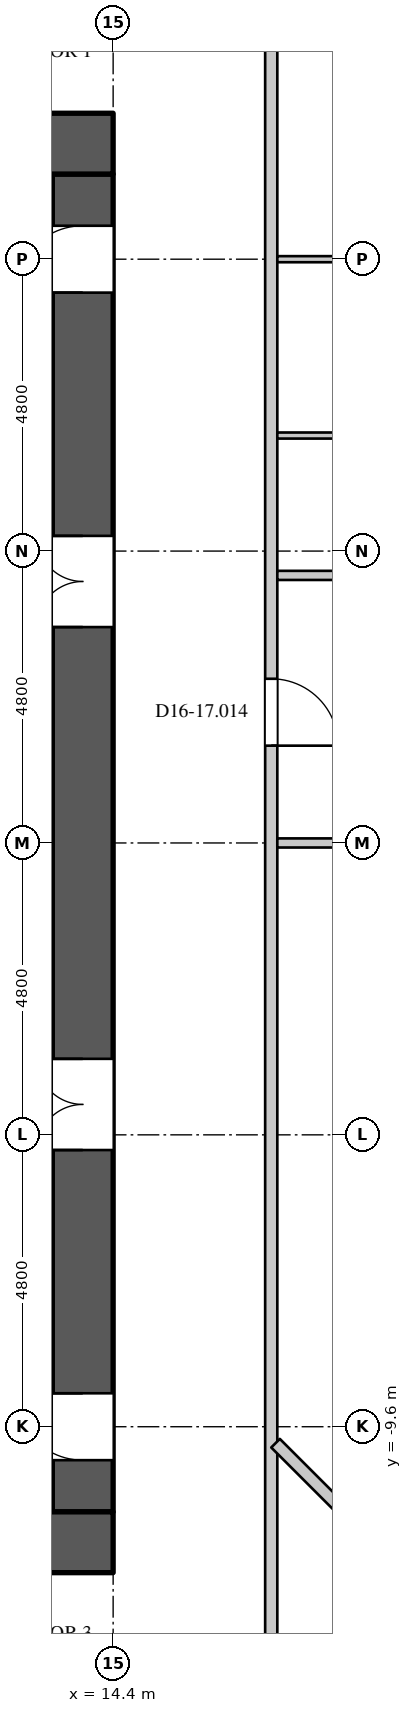
"""IFC4 building model, lengths in metres.
Left out: names, types, materials, properties, quantities, classifications, styles, units other than length and angle.
Written with IfcOpenShell. Run it as: python <this file> out.ifc"""

import sys

from ifc_helpers import new_model, si_unit, direction, frame, frame_2d, origin, place, context, subcontext, project, spatial, rectangle, extrude, element, fill, save


model = new_model("IFC4")
c1 = context("Model", 3, precision=1e-05, world=origin(), true_north=direction((0.0, 1.0)))
c2 = subcontext(c1, "Body", "Model", "MODEL_VIEW")
j1 = project(units=[si_unit("LENGTHUNIT", "METRE"), si_unit("PLANEANGLEUNIT", "RADIAN")], contexts=[c1])
p1 = place(None, origin())
s1 = spatial("IfcSite", under=j1, at=p1, CompositionType="ELEMENT")
p2 = place(p1, origin())
s2 = spatial("IfcBuilding", under=s1, at=p2, CompositionType="ELEMENT")
p3 = place(p2, frame((0.0, 0.0, 71.7)))
s3 = spatial("IfcBuildingStorey", under=s2, at=p3, CompositionType="ELEMENT", Elevation=71.7)
for number, where, z_axis, x_axis in (
    (1, (-14.4, 11.5, 0.0), (0.0, 0.0, 1.0), (1.0, 0.0, 0.0)),
    (2, (-14.4, -11.5, 0.0), (0.0, 0.0, 1.0), (1.0, 0.0, 0.0)),
):
    element("IfcWall", number, at=place(p3, frame(where, z_axis=z_axis, x_axis=x_axis)), inside=s3, PredefinedType="SHEAR", context=c2, shape_type="SweptSolid", body=[
        extrude(rectangle(XDim=28.8, YDim=1.0, at=frame_2d((14.4, 0.0))), origin(), (0.0, 0.0, 1.0), 4.2),
    ])
p4 = place(p3, frame((13.9, -11.0, 0.0), z_axis=(0.0, 0.0, 1.0), x_axis=(0.0, 1.0, 0.0)))
e3 = element("IfcWall", 3, at=p4, inside=s3, PredefinedType="SHEAR", context=c2, shape_type="SweptSolid", body=[
    extrude(rectangle(XDim=22.0, YDim=1.0, at=frame_2d((11.0, 0.0))), origin(), (0.0, 0.0, 1.0), 4.2),
])
p5 = place(p4, frame((20.05, 0.0, 0.0)))
e4 = element("IfcOpeningElement", 4, at=p5, cuts=e3, PredefinedType="OPENING", context=c2, shape_type="SweptSolid", body=[
    extrude(rectangle(XDim=1.1, YDim=2.2, at=frame_2d((0.55, 1.1))), frame((0.0, 0.51, 0.0), z_axis=(0.0, -1.0, 0.0), x_axis=(1.0, 0.0, 0.0)), (0.0, 0.0, 1.0), 1.02),
])
p6 = place(p4, frame((0.85, 0.0, 0.0)))
e5 = element("IfcOpeningElement", 5, at=p6, cuts=e3, PredefinedType="OPENING", context=c2, shape_type="SweptSolid", body=[
    extrude(rectangle(XDim=1.1, YDim=2.2, at=frame_2d((0.55, 1.1))), frame((0.0, 0.51, 0.0), z_axis=(0.0, -1.0, 0.0), x_axis=(1.0, 0.0, 0.0)), (0.0, 0.0, 1.0), 1.02),
])
p7 = place(p4, frame((14.55, 0.0, 0.0)))
e6 = element("IfcOpeningElement", 6, at=p7, cuts=e3, PredefinedType="OPENING", context=c2, shape_type="SweptSolid", body=[
    extrude(rectangle(XDim=1.5, YDim=2.4, at=frame_2d((0.75, 1.2))), frame((0.0, 0.51, 0.0), z_axis=(0.0, -1.0, 0.0), x_axis=(1.0, 0.0, 0.0)), (0.0, 0.0, 1.0), 1.02),
])
p8 = place(p4, frame((5.95, 0.0, 0.0)))
e7 = element("IfcOpeningElement", 7, at=p8, cuts=e3, PredefinedType="OPENING", context=c2, shape_type="SweptSolid", body=[
    extrude(rectangle(XDim=1.5, YDim=2.4, at=frame_2d((0.75, 1.2))), frame((0.0, 0.51, 0.0), z_axis=(0.0, -1.0, 0.0), x_axis=(1.0, 0.0, 0.0)), (0.0, 0.0, 1.0), 1.02),
])
p9 = place(p3, frame((17.0, -14.5, 0.0), z_axis=(0.0, 0.0, 1.0), x_axis=(0.0, 1.0, 0.0)))
e8 = element("IfcWall", 8, at=p9, inside=s3, PredefinedType="PARTITIONING", context=c2, shape_type="SweptSolid", body=[
    extrude(rectangle(XDim=29.0, YDim=0.2, at=frame_2d((14.5, 0.0))), origin(), (0.0, 0.0, 1.0), 3.95),
])
p10 = place(p9, frame((16.1, 0.0, 0.0)))
e9 = element("IfcOpeningElement", 9, at=p10, cuts=e8, PredefinedType="OPENING", context=c2, shape_type="SweptSolid", body=[
    extrude(rectangle(XDim=1.1, YDim=2.4, at=frame_2d((0.55, 1.2))), frame((0.0, 0.11, 0.0), z_axis=(0.0, -1.0, 0.0), x_axis=(1.0, 0.0, 0.0)), (0.0, 0.0, 1.0), 0.22),
])
p11 = place(p3, frame((17.1, 0.0, 0.0), z_axis=(0.0, 0.0, 1.0), x_axis=(1.0, 0.0, 0.0)))
e10 = element("IfcWall", 10, at=p11, inside=s3, PredefinedType="PARTITIONING", context=c2, shape_type="SweptSolid", body=[
    extrude(rectangle(XDim=11.755, YDim=0.15, at=frame_2d((5.877, 0.0))), origin(), (0.0, 0.0, 1.0), 3.95),
])
p12 = place(p11, frame((1.85, 0.0, 0.0)))
e11 = element("IfcOpeningElement", 11, at=p12, cuts=e10, PredefinedType="OPENING", context=c2, shape_type="SweptSolid", body=[
    extrude(rectangle(XDim=0.95, YDim=2.2, at=frame_2d((0.475, 1.1))), frame((0.0, 0.085, 0.0), z_axis=(0.0, -1.0, 0.0), x_axis=(1.0, 0.0, 0.0)), (0.0, 0.0, 1.0), 0.17),
])
p13 = place(p3, frame((17.1, 4.4, 0.0), z_axis=(0.0, 0.0, 1.0), x_axis=(1.0, 0.0, 0.0)))
e12 = element("IfcWall", 12, at=p13, inside=s3, PredefinedType="PARTITIONING", context=c2, shape_type="SweptSolid", body=[
    extrude(rectangle(XDim=4.625, YDim=0.15, at=frame_2d((2.312, 0.0))), origin(), (0.0, 0.0, 1.0), 3.95),
])
p14 = place(p13, frame((1.85, 0.0, 0.0)))
e13 = element("IfcOpeningElement", 13, at=p14, cuts=e12, PredefinedType="OPENING", context=c2, shape_type="SweptSolid", body=[
    extrude(rectangle(XDim=0.95, YDim=2.2, at=frame_2d((0.475, 1.1))), frame((0.0, 0.085, 0.0), z_axis=(0.0, -1.0, 0.0), x_axis=(1.0, 0.0, 0.0)), (0.0, 0.0, 1.0), 0.17),
])
p15 = place(p3, frame((17.216, 17.216, 0.0), z_axis=(0.0, 0.0, 1.0), x_axis=(0.707122656422, -0.707090905595, 0.0)))
e14 = element("IfcWall", 14, at=p15, inside=s3, PredefinedType="PARTITIONING", context=c2, shape_type="SweptSolid", body=[
    extrude(rectangle(XDim=7.689, YDim=0.15, at=frame_2d((3.845, 0.0))), origin(), (0.0, 0.0, 1.0), 3.95),
])
p16 = place(p15, frame((6.55, 0.0, 0.0)))
e15 = element("IfcOpeningElement", 15, at=p16, cuts=e14, PredefinedType="OPENING", context=c2, shape_type="SweptSolid", body=[
    extrude(rectangle(XDim=0.95, YDim=2.2, at=frame_2d((0.475, 1.1))), frame((0.0, 0.085, 0.0), z_axis=(0.0, -1.0, 0.0), x_axis=(1.0, 0.0, 0.0)), (0.0, 0.0, 1.0), 0.17),
])
p17 = place(p15, frame((2.6, 0.0, 0.0)))
e16 = element("IfcOpeningElement", 16, at=p17, cuts=e14, PredefinedType="OPENING", context=c2, shape_type="SweptSolid", body=[
    extrude(rectangle(XDim=0.95, YDim=2.2, at=frame_2d((0.475, 1.1))), frame((0.0, 0.085, 0.0), z_axis=(0.0, -1.0, 0.0), x_axis=(1.0, 0.0, 0.0)), (0.0, 0.0, 1.0), 0.17),
])
p18 = place(p3, frame((17.071, -9.871, 0.0), z_axis=(0.0, 0.0, 1.0), x_axis=(0.707096213553, -0.707117348662, 0.0)))
e17 = element("IfcWall", 17, at=p18, inside=s3, PredefinedType="PARTITIONING", context=c2, shape_type="SweptSolid", body=[
    extrude(rectangle(XDim=11.552, YDim=0.2, at=frame_2d((5.776, 0.0))), origin(), (0.0, 0.0, 1.0), 3.95),
])
p19 = place(p3, frame((17.1, 6.7, 0.0), z_axis=(0.0, 0.0, 1.0), x_axis=(1.0, 0.0, 0.0)))
e18 = element("IfcWall", 18, at=p19, inside=s3, PredefinedType="PARTITIONING", context=c2, shape_type="SweptSolid", body=[
    extrude(rectangle(XDim=4.625, YDim=0.1, at=frame_2d((2.312, 0.0))), origin(), (0.0, 0.0, 1.0), 3.95),
])
p20 = place(p3, frame((17.1, 9.6, 0.0), z_axis=(0.0, 0.0, 1.0), x_axis=(1.0, 0.0, 0.0)))
e19 = element("IfcWall", 19, at=p20, inside=s3, PredefinedType="PARTITIONING", context=c2, shape_type="SweptSolid", body=[
    extrude(rectangle(XDim=4.7, YDim=0.1, at=frame_2d((2.35, 0.0))), origin(), (0.0, 0.0, 1.0), 3.95),
])
p21 = place(p20, frame((1.85, 0.0, 0.0)))
e20 = element("IfcOpeningElement", 20, at=p21, cuts=e19, PredefinedType="OPENING", context=c2, shape_type="SweptSolid", body=[
    extrude(rectangle(XDim=0.9, YDim=2.2, at=frame_2d((0.45, 1.1))), frame((0.0, 0.06, 0.0), z_axis=(0.0, -1.0, 0.0), x_axis=(1.0, 0.0, 0.0)), (0.0, 0.0, 1.0), 0.12),
])
p22 = place(p5, origin())
e21 = element("IfcDoor", 21, at=p22, inside=s3, OperationType="SINGLE_SWING_LEFT", PredefinedType="DOOR", context=c2, shape_type="SweptSolid", body=[
    extrude(rectangle(XDim=1.1, YDim=2.2, at=frame_2d((0.55, 1.1))), frame((0.0, 0.495, 0.0), z_axis=(0.0, -1.0, 0.0), x_axis=(1.0, 0.0, 0.0)), (0.0, 0.0, 1.0), 0.05),
])
fill(e4, e21)
p23 = place(p6, origin())
e22 = element("IfcDoor", 22, at=p23, inside=s3, OperationType="SINGLE_SWING_RIGHT", PredefinedType="DOOR", context=c2, shape_type="SweptSolid", body=[
    extrude(rectangle(XDim=1.1, YDim=2.2, at=frame_2d((0.55, 1.1))), frame((0.0, 0.495, 0.0), z_axis=(0.0, -1.0, 0.0), x_axis=(1.0, 0.0, 0.0)), (0.0, 0.0, 1.0), 0.05),
])
fill(e5, e22)
p24 = place(p7, origin())
e23 = element("IfcDoor", 23, at=p24, inside=s3, OperationType="DOUBLE_DOOR_SINGLE_SWING", PredefinedType="DOOR", context=c2, shape_type="SweptSolid", body=[
    extrude(rectangle(XDim=1.5, YDim=2.4, at=frame_2d((0.75, 1.2))), frame((0.0, 0.495, 0.0), z_axis=(0.0, -1.0, 0.0), x_axis=(1.0, 0.0, 0.0)), (0.0, 0.0, 1.0), 0.05),
])
fill(e6, e23)
p25 = place(p8, origin())
e24 = element("IfcDoor", 24, at=p25, inside=s3, OperationType="DOUBLE_DOOR_SINGLE_SWING", PredefinedType="DOOR", context=c2, shape_type="SweptSolid", body=[
    extrude(rectangle(XDim=1.5, YDim=2.4, at=frame_2d((0.75, 1.2))), frame((0.0, 0.495, 0.0), z_axis=(0.0, -1.0, 0.0), x_axis=(1.0, 0.0, 0.0)), (0.0, 0.0, 1.0), 0.05),
])
fill(e7, e24)
p26 = place(p10, origin())
e25 = element("IfcDoor", 25, at=p26, inside=s3, OperationType="SINGLE_SWING_RIGHT", PredefinedType="DOOR", context=c2, shape_type="SweptSolid", body=[
    extrude(rectangle(XDim=1.1, YDim=2.4, at=frame_2d((0.55, 1.2))), frame((0.0, 0.025, 0.0), z_axis=(0.0, -1.0, 0.0), x_axis=(1.0, 0.0, 0.0)), (0.0, 0.0, 1.0), 0.05),
])
fill(e9, e25)
save(model, sys.argv[1])
